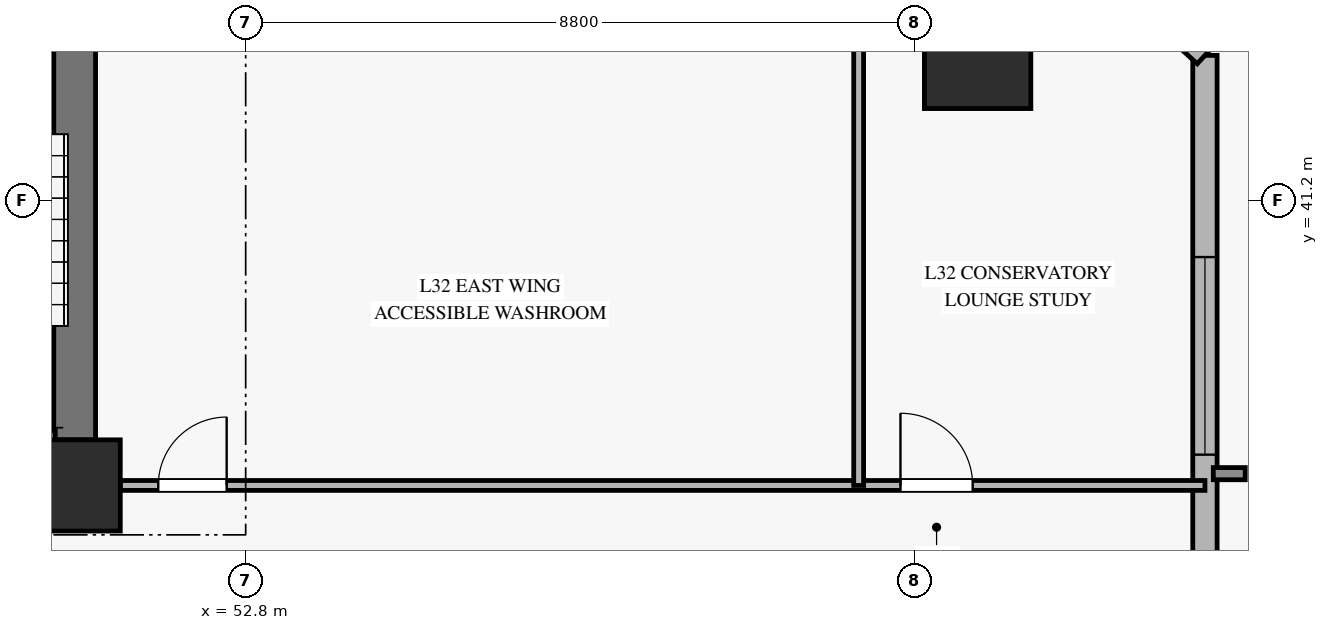
"""IFC4 building model, lengths in metres.
Left out: names, types, materials, properties, quantities, classifications, styles, units other than length and angle.
Written with IfcOpenShell. Run it as: python <this file> out.ifc"""

import sys

from ifc_helpers import new_model, si_unit, direction, frame, frame_2d, origin, origin_2d, place, context, subcontext, project, spatial, rectangle, hollow_rectangle, extrude, source, transform, mapped, element, fill, save


model = new_model("IFC4")
c1 = context("Model", 3, precision=1e-05, world=origin(), true_north=direction((0.0, 1.0)))
c2 = subcontext(c1, "Body", "Model", "MODEL_VIEW")
j1 = project(units=[si_unit("LENGTHUNIT", "METRE"), si_unit("PLANEANGLEUNIT", "RADIAN")], contexts=[c1])
p1 = place(None, origin())
s1 = spatial("IfcSite", under=j1, at=p1, CompositionType="ELEMENT")
p2 = place(p1, origin())
s2 = spatial("IfcBuilding", under=s1, at=p2, CompositionType="ELEMENT")
p3 = place(p2, frame((0.0, 0.0, 130.9)))
s3 = spatial("IfcBuildingStorey", under=s2, at=p3, CompositionType="ELEMENT", Elevation=130.9)
m1 = source(origin(), c2, "Body", "SweptSolid", [
    extrude(rectangle(XDim=1.2, YDim=1.2, at=origin_2d()), origin(), (0.0, 0.0, 1.0), 6.57),
])
p4 = place(p3, frame((50.55, 37.45, 0.0), z_axis=(0.0, 0.0, 1.0), x_axis=(1.0, 0.0, 0.0)))
e1 = element("IfcColumn", 1, at=p4, inside=s3, PredefinedType="PILASTER", context=c2, shape_type="MappedRepresentation", body=[
    mapped(m1, transform((0.0, 0.0, 0.0), x_axis=(1.0, 0.0, 0.0), y_axis=(0.0, 1.0, 0.0), z_axis=(0.0, 0.0, 1.0), scale=1.0)),
])
p5 = place(p3, frame((50.55, 38.05, 0.0), z_axis=(0.0, 0.0, 1.0), x_axis=(0.0, 1.0, 0.0)))
e2 = element("IfcWall", 2, at=p5, inside=s3, PredefinedType="SHEAR", context=c2, shape_type="SweptSolid", body=[
    extrude(rectangle(XDim=7.9, YDim=0.55, at=frame_2d((3.95, 0.0))), origin(), (0.0, 0.0, 1.0), 6.57),
])
m2 = source(origin(), c2, "Body", "SweptSolid", [
    extrude(hollow_rectangle(XDim=1.4, YDim=1.4, WallThickness=0.065, at=origin_2d()), origin(), (0.0, 0.0, 1.0), 6.573),
])
p6 = place(p3, frame((62.43, 43.109, 0.0), z_axis=(-0.031792241999, 0.003825468371, 0.999487178077), x_axis=(-0.119465364478, -0.992838368865, 0.0)))
e3 = element("IfcColumn", 3, at=p6, inside=s3, PredefinedType="COLUMN", context=c2, shape_type="MappedRepresentation", body=[
    mapped(m2, transform((0.0, 0.0, 0.0), x_axis=(1.0, 0.0, 0.0), y_axis=(0.0, 1.0, 0.0), z_axis=(0.0, 0.0, 1.0), scale=1.0)),
])
p7 = place(p3, frame((65.421, 27.259, 0.0), z_axis=(0.0, 0.0, 1.0), x_axis=(0.0, 1.0, 0.0)))
e4 = element("IfcWall", 4, at=p7, inside=s3, PredefinedType="SOLIDWALL", context=c2, shape_type="SweptSolid", body=[
    extrude(rectangle(XDim=15.85, YDim=0.32, at=frame_2d((7.925, 0.0))), origin(), (0.0, 0.0, 1.0), 6.05),
])
p8 = place(p7, frame((10.596, 0.0, 0.45)))
e5 = element("IfcOpeningElement", 5, at=p8, cuts=e4, PredefinedType="OPENING", context=c2, shape_type="SweptSolid", body=[
    extrude(rectangle(XDim=2.6, YDim=2.4, at=frame_2d((1.3, 1.2))), frame((0.0, 0.17, 0.0), z_axis=(0.0, -1.0, 0.0), x_axis=(1.0, 0.0, 0.0)), (0.0, 0.0, 1.0), 0.34),
])
p9 = place(p3, frame((65.421, 43.109, 0.0), z_axis=(0.0, 0.0, 1.0), x_axis=(-0.738549020912, 0.674199780265, 0.0)))
e6 = element("IfcWall", 6, at=p9, inside=s3, PredefinedType="SOLIDWALL", context=c2, shape_type="SweptSolid", body=[
    extrude(rectangle(XDim=4.659, YDim=0.3, at=frame_2d((2.33, 0.0))), origin(), (0.0, 0.0, 1.0), 6.05),
])
p10 = place(p9, frame((1.53, 0.0, 0.45)))
e7 = element("IfcOpeningElement", 7, at=p10, cuts=e6, PredefinedType="OPENING", context=c2, shape_type="SweptSolid", body=[
    extrude(rectangle(XDim=1.6, YDim=2.0, at=frame_2d((0.8, 1.0))), frame((0.0, 0.16, 0.0), z_axis=(0.0, -1.0, 0.0), x_axis=(1.0, 0.0, 0.0)), (0.0, 0.0, 1.0), 0.32),
])
p11 = place(p3, frame((47.44, 38.07, 0.0), z_axis=(0.0, 0.0, 1.0), x_axis=(1.0, 0.0, 0.0)))
e8 = element("IfcWall", 8, at=p11, inside=s3, PredefinedType="SOLIDWALL", context=c2, shape_type="SweptSolid", body=[
    extrude(rectangle(XDim=2.855, YDim=0.2, at=frame_2d((1.427, 0.0))), origin(), (0.0, 0.0, 1.0), 6.8),
])
p12 = place(p3, frame((51.15, 37.45, 0.0), z_axis=(0.0, 0.0, 1.0), x_axis=(1.0, 0.0, 0.0)))
e9 = element("IfcWall", 9, at=p12, inside=s3, PredefinedType="PARTITIONING", context=c2, shape_type="SweptSolid", body=[
    extrude(rectangle(XDim=14.271, YDim=0.13, at=frame_2d((7.135, 0.0))), origin(), (0.0, 0.0, 1.0), 6.055),
])
p13 = place(p12, frame((0.5, 0.0, 0.0)))
e10 = element("IfcOpeningElement", 10, at=p13, cuts=e9, PredefinedType="OPENING", context=c2, shape_type="SweptSolid", body=[
    extrude(rectangle(XDim=0.9, YDim=2.1, at=frame_2d((0.45, 1.05))), frame((0.0, 0.075, 0.0), z_axis=(0.0, -1.0, 0.0), x_axis=(1.0, 0.0, 0.0)), (0.0, 0.0, 1.0), 0.15),
])
p14 = place(p12, frame((10.265, 0.0, 0.0)))
e11 = element("IfcOpeningElement", 11, at=p14, cuts=e9, PredefinedType="OPENING", context=c2, shape_type="SweptSolid", body=[
    extrude(rectangle(XDim=0.95, YDim=2.1, at=frame_2d((0.475, 1.05))), frame((0.0, 0.075, 0.0), z_axis=(0.0, -1.0, 0.0), x_axis=(1.0, 0.0, 0.0)), (0.0, 0.0, 1.0), 0.15),
])
p15 = place(p3, frame((60.865, 37.45, 0.0), z_axis=(0.0, 0.0, 1.0), x_axis=(0.0, 1.0, 0.0)))
e12 = element("IfcWall", 12, at=p15, inside=s3, PredefinedType="PARTITIONING", context=c2, shape_type="SweptSolid", body=[
    extrude(rectangle(XDim=8.8, YDim=0.13, at=frame_2d((4.4, 0.0))), origin(), (0.0, 0.0, 1.0), 6.57),
])
m3 = source(origin(), c2, "Body", "SweptSolid", [
    extrude(rectangle(XDim=2.6, YDim=2.4, at=frame_2d((1.3, 1.2))), frame((0.0, 0.03, 0.0), z_axis=(0.0, -1.0, 0.0), x_axis=(1.0, 0.0, 0.0)), (0.0, 0.0, 1.0), 0.06),
])
p16 = place(p8, origin())
e13 = element("IfcWindow", 13, at=p16, inside=s3, PartitioningType="SINGLE_PANEL", PredefinedType="WINDOW", context=c2, shape_type="MappedRepresentation", body=[
    mapped(m3, transform((0.0, 0.0, 0.0), x_axis=(1.0, 0.0, 0.0), y_axis=(0.0, 1.0, 0.0), z_axis=(0.0, 0.0, 1.0), scale=1.0)),
])
fill(e5, e13)
m4 = source(origin(), c2, "Body", "SweptSolid", [
    extrude(rectangle(XDim=0.9, YDim=2.1, at=frame_2d((0.45, 1.05))), frame((0.0, 0.025, 0.0), z_axis=(0.0, -1.0, 0.0), x_axis=(1.0, 0.0, 0.0)), (0.0, 0.0, 1.0), 0.05),
])
p17 = place(p13, origin())
e14 = element("IfcDoor", 14, at=p17, inside=s3, OperationType="SINGLE_SWING_RIGHT", PredefinedType="DOOR", context=c2, shape_type="MappedRepresentation", body=[
    mapped(m4, transform((0.0, 0.0, 0.0), x_axis=(1.0, 0.0, 0.0), y_axis=(0.0, 1.0, 0.0), z_axis=(0.0, 0.0, 1.0), scale=1.0)),
])
fill(e10, e14)
m5 = source(origin(), c2, "Body", "SweptSolid", [
    extrude(rectangle(XDim=0.95, YDim=2.1, at=frame_2d((0.475, 1.05))), frame((0.0, 0.025, 0.0), z_axis=(0.0, -1.0, 0.0), x_axis=(1.0, 0.0, 0.0)), (0.0, 0.0, 1.0), 0.05),
])
p18 = place(p14, origin())
e15 = element("IfcDoor", 15, at=p18, inside=s3, OperationType="SINGLE_SWING_LEFT", PredefinedType="DOOR", context=c2, shape_type="MappedRepresentation", body=[
    mapped(m5, transform((0.0, 0.0, 0.0), x_axis=(1.0, 0.0, 0.0), y_axis=(0.0, 1.0, 0.0), z_axis=(0.0, 0.0, 1.0), scale=1.0)),
])
fill(e11, e15)
save(model, sys.argv[1])
